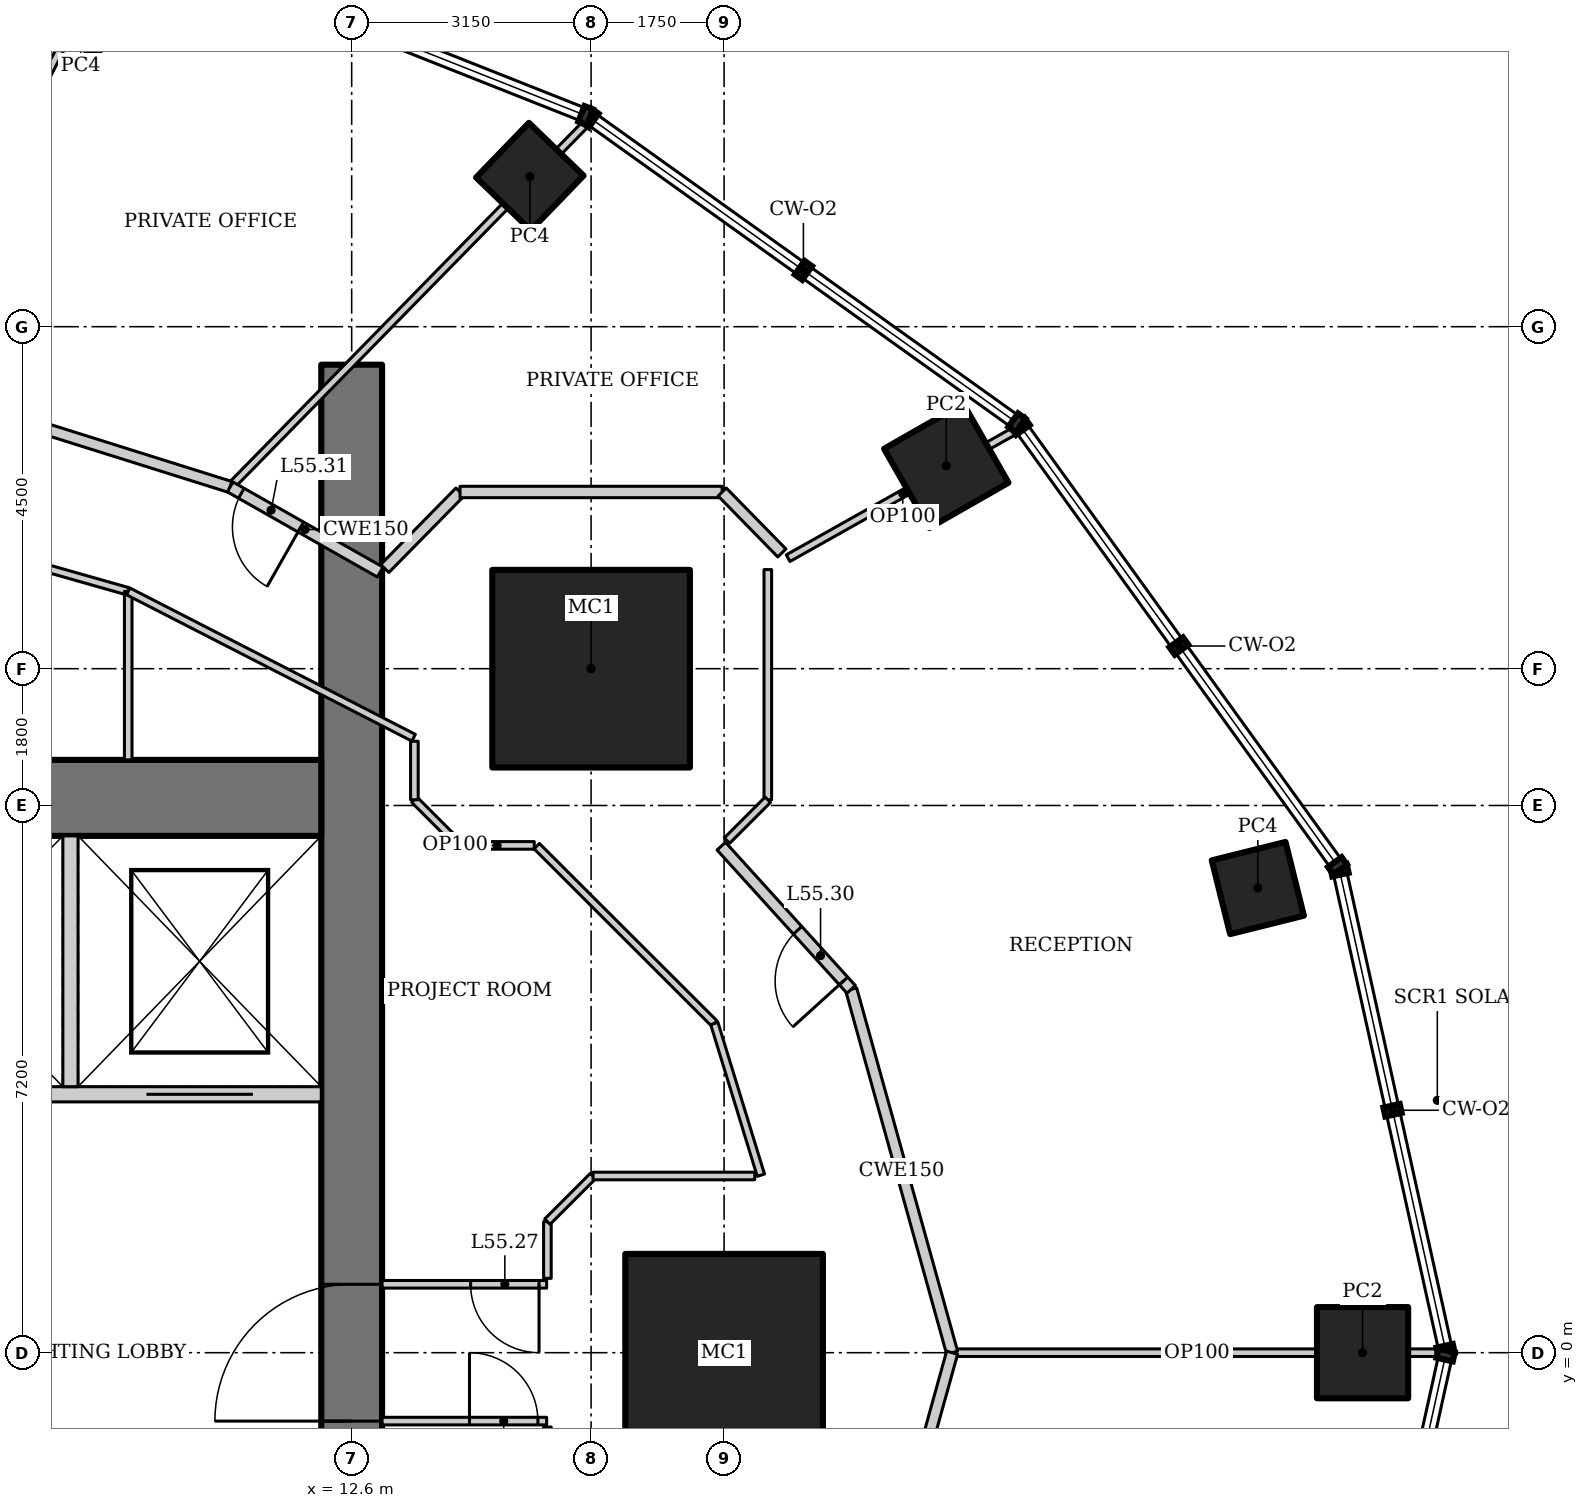
"""IFC4 building model, lengths in metres.
Left out: names, types, materials, properties, quantities, classifications, styles, units other than length and angle.
Written with IfcOpenShell. Run it as: python <this file> out.ifc"""

import sys

from ifc_helpers import new_model, si_unit, direction, frame, frame_2d, origin, origin_2d, place, context, subcontext, project, spatial, rectangle, hollow_rectangle, extrude, element, fill, save


model = new_model("IFC4")
c1 = context("Model", 3, precision=1e-05, world=origin(), true_north=direction((0.0, 1.0)))
c2 = subcontext(c1, "Body", "Model", "MODEL_VIEW")
j1 = project(units=[si_unit("LENGTHUNIT", "METRE"), si_unit("PLANEANGLEUNIT", "RADIAN")], contexts=[c1])
p1 = place(None, origin())
s1 = spatial("IfcSite", under=j1, at=p1, CompositionType="ELEMENT")
p2 = place(p1, origin())
s2 = spatial("IfcBuilding", under=s1, at=p2, CompositionType="ELEMENT")
p3 = place(p2, frame((0.0, 0.0, 236.8)))
s3 = spatial("IfcBuildingStorey", under=s2, at=p3, CompositionType="ELEMENT", Elevation=236.8)
for number, where, z_axis, x_axis in (
    (1, (17.5, 0.0, 0.0), (0.0, 0.0, 1.0), (1.0, 0.0, 0.0)),
    (2, (15.75, 9.0, 0.0), (0.0, 0.0, 1.0), (1.0, 0.0, 0.0)),
):
    element("IfcColumn", number, at=place(p3, frame(where, z_axis=z_axis, x_axis=x_axis)), inside=s3, PredefinedType="COLUMN", context=c2, shape_type="SweptSolid", body=[
        extrude(hollow_rectangle(XDim=2.6, YDim=2.6, WallThickness=0.13, at=origin_2d()), origin(), (0.0, 0.0, 1.0), 4.2),
    ])
p4 = place(p3, frame((25.9, 0.0, 0.0), z_axis=(0.0, 0.0, 1.0), x_axis=(1.0, 0.0, 0.0)))
e3 = element("IfcColumn", 3, at=p4, inside=s3, PredefinedType="COLUMN", context=c2, shape_type="SweptSolid", body=[
    extrude(hollow_rectangle(XDim=1.2, YDim=1.2, WallThickness=0.1, at=origin_2d()), origin(), (0.0, 0.0, 1.0), 4.2),
])
p5 = place(p3, frame((24.522, 6.114, 0.0), z_axis=(0.0, 0.0, 1.0), x_axis=(0.970295726276, 0.2419218956, 0.0)))
e4 = element("IfcColumn", 4, at=p5, inside=s3, PredefinedType="COLUMN", context=c2, shape_type="SweptSolid", body=[
    extrude(hollow_rectangle(XDim=1.0, YDim=1.0, WallThickness=0.08, at=origin_2d()), origin(), (0.0, 0.0, 1.0), 4.2),
])
p6 = place(p3, frame((20.423, 11.67, 0.0), z_axis=(0.0, 0.0, 1.0), x_axis=(0.86824298017, 0.496139221777, 0.0)))
e5 = element("IfcColumn", 5, at=p6, inside=s3, PredefinedType="COLUMN", context=c2, shape_type="SweptSolid", body=[
    extrude(hollow_rectangle(XDim=1.2, YDim=1.2, WallThickness=0.1, at=origin_2d()), origin(), (0.0, 0.0, 1.0), 4.2),
])
for number, where, z_axis, x_axis in (
    (6, (14.944, 15.475, 0.0), (0.0, 0.0, 1.0), (0.695, 0.719, 0.0)),
    (7, (9.035, 17.731, 0.0), (0.0, 0.0, 1.0), (0.454, 0.891, 0.0)),
):
    element("IfcColumn", number, at=place(p3, frame(where, z_axis=z_axis, x_axis=x_axis)), inside=s3, PredefinedType="COLUMN", context=c2, shape_type="SweptSolid", body=[
        extrude(hollow_rectangle(XDim=1.0, YDim=1.0, WallThickness=0.08, at=origin_2d()), origin(), (0.0, 0.0, 1.0), 4.2),
    ])
p7 = place(p3, frame((12.6, -13.0, 0.0), z_axis=(0.0, 0.0, 1.0), x_axis=(0.0, 1.0, 0.0)))
e8 = element("IfcWall", 8, at=p7, inside=s3, PredefinedType="SHEAR", context=c2, shape_type="SweptSolid", body=[
    extrude(rectangle(XDim=26.0, YDim=0.8, at=frame_2d((13.0, 0.0))), origin(), (0.0, 0.0, 1.0), 4.2),
])
p8 = place(p7, frame((12.1, 0.0, 0.0)))
e9 = element("IfcOpeningElement", 9, at=p8, cuts=e8, PredefinedType="OPENING", context=c2, shape_type="SweptSolid", body=[
    extrude(rectangle(XDim=1.8, YDim=2.1, at=frame_2d((0.9, 1.05))), frame((0.0, 0.41, 0.0), z_axis=(0.0, -1.0, 0.0), x_axis=(1.0, 0.0, 0.0)), (0.0, 0.0, 1.0), 0.82),
])
p9 = place(p3, frame((12.2, 7.3, 0.0), z_axis=(0.0, 0.0, 1.0), x_axis=(-1.0, 0.0, 0.0)))
e10 = element("IfcWall", 10, at=p9, inside=s3, PredefinedType="SHEAR", context=c2, shape_type="SweptSolid", body=[
    extrude(rectangle(XDim=6.6, YDim=1.0, at=frame_2d((3.3, 0.0))), origin(), (0.0, 0.0, 1.0), 4.2),
])
p10 = place(p3, frame((12.2, 3.4, 0.0), z_axis=(0.0, 0.0, 1.0), x_axis=(-1.0, 0.0, 0.0)))
e11 = element("IfcWall", 11, at=p10, inside=s3, PredefinedType="SOLIDWALL", context=c2, shape_type="SweptSolid", body=[
    extrude(rectangle(XDim=6.6, YDim=0.2, at=frame_2d((3.3, 0.0))), origin(), (0.0, 0.0, 1.0), 4.2),
])
p11 = place(p10, frame((4.45, 0.0, 0.0)))
e12 = element("IfcOpeningElement", 12, at=p11, cuts=e11, PredefinedType="OPENING", context=c2, shape_type="SweptSolid", body=[
    extrude(rectangle(XDim=1.1, YDim=2.2, at=frame_2d((0.55, 1.1))), frame((0.0, 0.11, 0.0), z_axis=(0.0, -1.0, 0.0), x_axis=(1.0, 0.0, 0.0)), (0.0, 0.0, 1.0), 0.22),
])
p12 = place(p10, frame((0.9, 0.0, 0.0)))
e13 = element("IfcOpeningElement", 13, at=p12, cuts=e11, PredefinedType="OPENING", context=c2, shape_type="SweptSolid", body=[
    extrude(rectangle(XDim=1.4, YDim=2.2, at=frame_2d((0.7, 1.1))), frame((0.0, 0.11, 0.0), z_axis=(0.0, -1.0, 0.0), x_axis=(1.0, 0.0, 0.0)), (0.0, 0.0, 1.0), 0.22),
])
p13 = place(p3, frame((8.9, 3.5, 0.0), z_axis=(0.0, 0.0, 1.0), x_axis=(0.0, 1.0, 0.0)))
e14 = element("IfcWall", 14, at=p13, inside=s3, PredefinedType="SOLIDWALL", context=c2, shape_type="SweptSolid", body=[
    extrude(rectangle(XDim=3.3, YDim=0.2, at=frame_2d((1.65, 0.0))), origin(), (0.0, 0.0, 1.0), 4.2),
])
p14 = place(p3, frame((26.944, 0.0, 0.0), z_axis=(0.0, 0.0, 1.0), x_axis=(-1.0, 0.0, 0.0)))
e15 = element("IfcWall", 15, at=p14, inside=s3, PredefinedType="PARTITIONING", context=c2, shape_type="SweptSolid", body=[
    extrude(rectangle(XDim=6.444, YDim=0.1, at=frame_2d((3.222, 0.0))), origin(), (0.0, 0.0, 1.0), 3.349),
])
p15 = place(p3, frame((15.709, 16.199, 0.0), z_axis=(0.0, 0.0, 1.0), x_axis=(-0.699758297028, -0.71437967898, 0.0)))
e16 = element("IfcWall", 16, at=p15, inside=s3, PredefinedType="PARTITIONING", context=c2, shape_type="SweptSolid", body=[
    extrude(rectangle(XDim=6.729, YDim=0.1, at=frame_2d((3.365, 0.0))), origin(), (0.0, 0.0, 1.0), 3.41),
])
p16 = place(p3, frame((9.54, 18.65, 0.0), z_axis=(0.0, 0.0, 1.0), x_axis=(-0.458420942987, -0.888735190611, 0.0)))
e17 = element("IfcWall", 17, at=p16, inside=s3, PredefinedType="PARTITIONING", context=c2, shape_type="SweptSolid", body=[
    extrude(rectangle(XDim=6.584, YDim=0.1, at=frame_2d((3.292, 0.0))), origin(), (0.0, 0.0, 1.0), 3.108),
])
p17 = place(p3, frame((20.5, 0.0, 0.0), z_axis=(0.0, 0.0, 1.0), x_axis=(-0.26770731566, 0.963500281859, 0.0)))
e18 = element("IfcWall", 18, at=p17, inside=s3, PredefinedType="PARTITIONING", context=c2, shape_type="SweptSolid", body=[
    extrude(rectangle(XDim=4.961, YDim=0.15, at=frame_2d((2.48, 0.0))), origin(), (0.0, 0.0, 1.0), 4.05),
])
p18 = place(p3, frame((11.001, 11.392, 0.0), z_axis=(0.0, 0.0, 1.0), x_axis=(-0.954031103669, 0.299707612903, 0.0)))
e19 = element("IfcWall", 19, at=p18, inside=s3, PredefinedType="PARTITIONING", context=c2, shape_type="SweptSolid", body=[
    extrude(rectangle(XDim=4.695, YDim=0.15, at=frame_2d((2.348, 0.0))), origin(), (0.0, 0.0, 1.0), 4.05),
])
p19 = place(p18, frame((3.645, 0.0, 0.0)))
e20 = element("IfcOpeningElement", 20, at=p19, cuts=e19, PredefinedType="OPENING", context=c2, shape_type="SweptSolid", body=[
    extrude(rectangle(XDim=0.9, YDim=2.1, at=frame_2d((0.45, 1.05))), frame((0.0, 0.085, 0.0), z_axis=(0.0, -1.0, 0.0), x_axis=(1.0, 0.0, 0.0)), (0.0, 0.0, 1.0), 0.17),
])
p20 = place(p3, frame((19.172, -4.78, 0.0), z_axis=(0.0, 0.0, 1.0), x_axis=(0.26770731566, 0.963500281859, 0.0)))
e21 = element("IfcWall", 21, at=p20, inside=s3, PredefinedType="PARTITIONING", context=c2, shape_type="SweptSolid", body=[
    extrude(rectangle(XDim=4.961, YDim=0.15, at=frame_2d((2.48, 0.0))), origin(), (0.0, 0.0, 1.0), 4.05),
])
p21 = place(p20, frame((0.15, 0.0, 0.0)))
e22 = element("IfcOpeningElement", 22, at=p21, cuts=e21, PredefinedType="OPENING", context=c2, shape_type="SweptSolid", body=[
    extrude(rectangle(XDim=0.9, YDim=2.1, at=frame_2d((0.45, 1.05))), frame((0.0, 0.085, 0.0), z_axis=(0.0, -1.0, 0.0), x_axis=(1.0, 0.0, 0.0)), (0.0, 0.0, 1.0), 0.17),
])
p22 = place(p3, frame((5.68, 11.147, 0.0), z_axis=(0.0, 0.0, 1.0), x_axis=(0.961970251804, -0.27315423234, 0.0)))
e23 = element("IfcWall", 23, at=p22, inside=s3, PredefinedType="PARTITIONING", context=c2, shape_type="SweptSolid", body=[
    extrude(rectangle(XDim=4.137, YDim=0.1, at=frame_2d((2.069, 0.0))), origin(), (0.0, 0.0, 1.0), 4.05),
])
p23 = place(p3, frame((9.66, 10.017, 0.0), z_axis=(0.0, 0.0, 1.0), x_axis=(0.0, -1.0, 0.0)))
e24 = element("IfcWall", 24, at=p23, inside=s3, PredefinedType="PARTITIONING", context=c2, shape_type="SweptSolid", body=[
    extrude(rectangle(XDim=2.217, YDim=0.1, at=frame_2d((1.108, 0.0))), origin(), (0.0, 0.0, 1.0), 4.05),
])
p24 = place(p3, frame((21.358, 12.15, 0.0), z_axis=(0.0, 0.0, 1.0), x_axis=(-0.871730019583, -0.489986502832, 0.0)))
e25 = element("IfcWall", 25, at=p24, inside=s3, PredefinedType="PARTITIONING", context=c2, shape_type="SweptSolid", body=[
    extrude(rectangle(XDim=3.46, YDim=0.1, at=frame_2d((1.73, 0.0))), origin(), (0.0, 0.0, 1.0), 3.524),
])
p25 = place(p3, frame((19.172, 4.78, 0.0), z_axis=(0.0, 0.0, 1.0), x_axis=(-0.671721890643, 0.74080341632, 0.0)))
e26 = element("IfcWall", 26, at=p25, inside=s3, PredefinedType="PARTITIONING", context=c2, shape_type="SweptSolid", body=[
    extrude(rectangle(XDim=2.544, YDim=0.15, at=frame_2d((1.272, 0.0))), origin(), (0.0, 0.0, 1.0), 4.05),
])
p26 = place(p25, frame((0.15, 0.0, 0.0)))
e27 = element("IfcOpeningElement", 27, at=p26, cuts=e26, PredefinedType="OPENING", context=c2, shape_type="SweptSolid", body=[
    extrude(rectangle(XDim=0.9, YDim=2.1, at=frame_2d((0.45, 1.05))), frame((0.0, 0.085, 0.0), z_axis=(0.0, -1.0, 0.0), x_axis=(1.0, 0.0, 0.0)), (0.0, 0.0, 1.0), 0.17),
])
p27 = place(p3, frame((12.975, 10.271, 0.0), z_axis=(0.0, 0.0, 1.0), x_axis=(-0.869722107117, 0.493541747366, 0.0)))
e28 = element("IfcWall", 28, at=p27, inside=s3, PredefinedType="PARTITIONING", context=c2, shape_type="SweptSolid", body=[
    extrude(rectangle(XDim=2.27, YDim=0.15, at=frame_2d((1.135, 0.0))), origin(), (0.0, 0.0, 1.0), 4.05),
])
p28 = place(p27, frame((1.2, 0.0, 0.0)))
e29 = element("IfcOpeningElement", 29, at=p28, cuts=e28, PredefinedType="OPENING", context=c2, shape_type="SweptSolid", body=[
    extrude(rectangle(XDim=0.9, YDim=2.1, at=frame_2d((0.45, 1.05))), frame((0.0, 0.085, 0.0), z_axis=(0.0, -1.0, 0.0), x_axis=(1.0, 0.0, 0.0)), (0.0, 0.0, 1.0), 0.17),
])
p29 = place(p3, frame((9.66, 10.017, 0.0), z_axis=(0.0, 0.0, 1.0), x_axis=(0.889833724874, -0.456284935185, 0.0)))
e30 = element("IfcWall", 30, at=p29, inside=s3, PredefinedType="PARTITIONING", context=c2, shape_type="SweptSolid", body=[
    extrude(rectangle(XDim=4.22, YDim=0.1, at=frame_2d((2.11, 0.0))), origin(), (0.0, 0.0, 1.0), 4.05),
])
p30 = place(p3, frame((15.035, 6.665, 0.0), z_axis=(0.0, 0.0, 1.0), x_axis=(0.707587114823, -0.70662612104, 0.0)))
e31 = element("IfcWall", 31, at=p30, inside=s3, PredefinedType="PARTITIONING", context=c2, shape_type="SweptSolid", body=[
    extrude(rectangle(XDim=3.303, YDim=0.1, at=frame_2d((1.651, 0.0))), origin(), (0.0, 0.0, 1.0), 4.05),
])
p31 = place(p3, frame((15.002, 6.675, 0.0), z_axis=(0.0, 0.0, 1.0), x_axis=(-1.0, 0.0, 0.0)))
e32 = element("IfcWall", 32, at=p31, inside=s3, PredefinedType="PARTITIONING", context=c2, shape_type="SweptSolid", body=[
    extrude(rectangle(XDim=0.977, YDim=0.1, at=frame_2d((0.488, 0.0))), origin(), (0.0, 0.0, 1.0), 4.05),
])
p32 = place(p3, frame((14.025, 6.675, 0.0), z_axis=(0.0, 0.0, 1.0), x_axis=(-0.707106781187, 0.707106781187, 0.0)))
e33 = element("IfcWall", 33, at=p32, inside=s3, PredefinedType="PARTITIONING", context=c2, shape_type="SweptSolid", body=[
    extrude(rectangle(XDim=0.849, YDim=0.1, at=frame_2d((0.425, 0.0))), origin(), (0.0, 0.0, 1.0), 4.05),
])
p33 = place(p3, frame((13.425, 7.275, 0.0), z_axis=(0.0, 0.0, 1.0), x_axis=(0.0, 1.0, 0.0)))
e34 = element("IfcWall", 34, at=p33, inside=s3, PredefinedType="PARTITIONING", context=c2, shape_type="SweptSolid", body=[
    extrude(rectangle(XDim=0.77, YDim=0.1, at=frame_2d((0.385, 0.0))), origin(), (0.0, 0.0, 1.0), 4.05),
])
p34 = place(p3, frame((18.075, 10.304, 0.0), z_axis=(0.0, 0.0, 1.0), x_axis=(0.0, -1.0, 0.0)))
e35 = element("IfcWall", 35, at=p34, inside=s3, PredefinedType="PARTITIONING", context=c2, shape_type="SweptSolid", body=[
    extrude(rectangle(XDim=3.029, YDim=0.1, at=frame_2d((1.514, 0.0))), origin(), (0.0, 0.0, 1.0), 3.6),
])
p35 = place(p3, frame((18.075, 7.275, 0.0), z_axis=(0.0, 0.0, 1.0), x_axis=(-0.707106781187, -0.707106781187, 0.0)))
e36 = element("IfcWall", 36, at=p35, inside=s3, PredefinedType="PARTITIONING", context=c2, shape_type="SweptSolid", body=[
    extrude(rectangle(XDim=0.76, YDim=0.1, at=frame_2d((0.38, 0.0))), origin(), (0.0, 0.0, 1.0), 4.05),
])
p36 = place(p3, frame((13.036, 10.319, 0.0), z_axis=(0.0, 0.0, 1.0), x_axis=(0.701113567316, 0.713049623606, 0.0)))
e37 = element("IfcWall", 37, at=p36, inside=s3, PredefinedType="PARTITIONING", context=c2, shape_type="SweptSolid", body=[
    extrude(rectangle(XDim=1.411, YDim=0.15, at=frame_2d((0.706, 0.0))), origin(), (0.0, 0.0, 1.0), 4.05),
])
p37 = place(p3, frame((14.025, 11.325, 0.0), z_axis=(0.0, 0.0, 1.0), x_axis=(1.0, 0.0, 0.0)))
e38 = element("IfcWall", 38, at=p37, inside=s3, PredefinedType="PARTITIONING", context=c2, shape_type="SweptSolid", body=[
    extrude(rectangle(XDim=3.449, YDim=0.15, at=frame_2d((1.725, 0.0))), origin(), (0.0, 0.0, 1.0), 4.05),
])
p38 = place(p3, frame((17.475, 11.325, 0.0), z_axis=(0.0, 0.0, 1.0), x_axis=(0.699453593529, -0.714678018761, 0.0)))
e39 = element("IfcWall", 39, at=p38, inside=s3, PredefinedType="PARTITIONING", context=c2, shape_type="SweptSolid", body=[
    extrude(rectangle(XDim=1.123, YDim=0.15, at=frame_2d((0.561, 0.0))), origin(), (0.0, 0.0, 1.0), 4.05),
])
p39 = place(p3, frame((13.0, -0.9, 0.0), z_axis=(0.0, 0.0, 1.0), x_axis=(1.0, 0.0, 0.0)))
e40 = element("IfcWall", 40, at=p39, inside=s3, PredefinedType="PARTITIONING", context=c2, shape_type="SweptSolid", body=[
    extrude(rectangle(XDim=2.165, YDim=0.1, at=frame_2d((1.083, 0.0))), origin(), (0.0, 0.0, 1.0), 4.05),
])
p40 = place(p39, frame((1.15, 0.0, 0.0)))
e41 = element("IfcOpeningElement", 41, at=p40, cuts=e40, PredefinedType="OPENING", context=c2, shape_type="SweptSolid", body=[
    extrude(rectangle(XDim=0.9, YDim=2.1, at=frame_2d((0.45, 1.05))), frame((0.0, 0.06, 0.0), z_axis=(0.0, -1.0, 0.0), x_axis=(1.0, 0.0, 0.0)), (0.0, 0.0, 1.0), 0.12),
])
p41 = place(p3, frame((17.372, 4.331, 0.0), z_axis=(0.0, 0.0, 1.0), x_axis=(0.293231279211, -0.956041535129, 0.0)))
e42 = element("IfcWall", 42, at=p41, inside=s3, PredefinedType="PARTITIONING", context=c2, shape_type="SweptSolid", body=[
    extrude(rectangle(XDim=2.088, YDim=0.1, at=frame_2d((1.044, 0.0))), origin(), (0.0, 0.0, 1.0), 4.05),
])
p42 = place(p3, frame((15.165, 0.9, 0.0), z_axis=(0.0, 0.0, 1.0), x_axis=(-1.0, 0.0, 0.0)))
e43 = element("IfcWall", 43, at=p42, inside=s3, PredefinedType="PARTITIONING", context=c2, shape_type="SweptSolid", body=[
    extrude(rectangle(XDim=2.165, YDim=0.1, at=frame_2d((1.083, 0.0))), origin(), (0.0, 0.0, 1.0), 4.05),
])
p43 = place(p42, frame((0.1, 0.0, 0.0)))
e44 = element("IfcOpeningElement", 44, at=p43, cuts=e43, PredefinedType="OPENING", context=c2, shape_type="SweptSolid", body=[
    extrude(rectangle(XDim=0.9, YDim=2.1, at=frame_2d((0.45, 1.05))), frame((0.0, 0.06, 0.0), z_axis=(0.0, -1.0, 0.0), x_axis=(1.0, 0.0, 0.0)), (0.0, 0.0, 1.0), 0.12),
])
for number, where, z_axis, x_axis in (
    (45, (15.175, -1.725, 0.0), (0.0, 0.0, 1.0), (0.0, 1.0, 0.0)),
    (46, (15.175, 0.978, 0.0), (0.0, 0.0, 1.0), (0.0, 1.0, 0.0)),
):
    element("IfcWall", number, at=place(p3, frame(where, z_axis=z_axis, x_axis=x_axis)), inside=s3, PredefinedType="PARTITIONING", context=c2, shape_type="SweptSolid", body=[
        extrude(rectangle(XDim=0.746, YDim=0.1, at=frame_2d((0.373, 0.0))), origin(), (0.0, 0.0, 1.0), 4.05),
    ])
p44 = place(p3, frame((15.175, 1.725, 0.0), z_axis=(0.0, 0.0, 1.0), x_axis=(0.707106781187, 0.707106781187, 0.0)))
e47 = element("IfcWall", 47, at=p44, inside=s3, PredefinedType="PARTITIONING", context=c2, shape_type="SweptSolid", body=[
    extrude(rectangle(XDim=0.849, YDim=0.1, at=frame_2d((0.425, 0.0))), origin(), (0.0, 0.0, 1.0), 4.05),
])
p45 = place(p3, frame((15.775, 2.325, 0.0), z_axis=(0.0, 0.0, 1.0), x_axis=(1.0, 0.0, 0.0)))
e48 = element("IfcWall", 48, at=p45, inside=s3, PredefinedType="PARTITIONING", context=c2, shape_type="SweptSolid", body=[
    extrude(rectangle(XDim=2.128, YDim=0.1, at=frame_2d((1.064, 0.0))), origin(), (0.0, 0.0, 1.0), 4.05),
])
p46 = place(p8, origin())
e49 = element("IfcDoor", 49, at=p46, inside=s3, OperationType="DOUBLE_DOOR_DOUBLE_SWING", PredefinedType="DOOR", context=c2, shape_type="SweptSolid", body=[
    extrude(rectangle(XDim=1.8, YDim=2.1, at=frame_2d((0.9, 1.05))), frame((0.0, 0.025, 0.0), z_axis=(0.0, -1.0, 0.0), x_axis=(1.0, 0.0, 0.0)), (0.0, 0.0, 1.0), 0.05),
])
fill(e9, e49)
p47 = place(p12, origin())
e50 = element("IfcDoor", 50, at=p47, inside=s3, OperationType="DOUBLE_DOOR_SLIDING", PredefinedType="DOOR", context=c2, shape_type="SweptSolid", body=[
    extrude(rectangle(XDim=1.4, YDim=2.2, at=frame_2d((0.7, 1.1))), frame((0.0, 0.025, 0.0), z_axis=(0.0, -1.0, 0.0), x_axis=(1.0, 0.0, 0.0)), (0.0, 0.0, 1.0), 0.05),
])
fill(e13, e50)
p48 = place(p40, origin())
e51 = element("IfcDoor", 51, at=p48, inside=s3, OperationType="SINGLE_SWING_LEFT", PredefinedType="DOOR", context=c2, shape_type="SweptSolid", body=[
    extrude(rectangle(XDim=0.9, YDim=2.1, at=frame_2d((0.45, 1.05))), frame((0.0, 0.025, 0.0), z_axis=(0.0, -1.0, 0.0), x_axis=(1.0, 0.0, 0.0)), (0.0, 0.0, 1.0), 0.05),
])
fill(e41, e51)
p49 = place(p43, origin())
e52 = element("IfcDoor", 52, at=p49, inside=s3, OperationType="SINGLE_SWING_LEFT", PredefinedType="DOOR", context=c2, shape_type="SweptSolid", body=[
    extrude(rectangle(XDim=0.9, YDim=2.1, at=frame_2d((0.45, 1.05))), frame((0.0, 0.025, 0.0), z_axis=(0.0, -1.0, 0.0), x_axis=(1.0, 0.0, 0.0)), (0.0, 0.0, 1.0), 0.05),
])
fill(e44, e52)
p50 = place(p26, origin())
e53 = element("IfcDoor", 53, at=p50, inside=s3, OperationType="SINGLE_SWING_LEFT", PredefinedType="DOOR", context=c2, shape_type="SweptSolid", body=[
    extrude(rectangle(XDim=0.9, YDim=2.1, at=frame_2d((0.45, 1.05))), frame((0.0, 0.025, 0.0), z_axis=(0.0, -1.0, 0.0), x_axis=(1.0, 0.0, 0.0)), (0.0, 0.0, 1.0), 0.05),
])
fill(e27, e53)
p51 = place(p28, origin())
e54 = element("IfcDoor", 54, at=p51, inside=s3, OperationType="SINGLE_SWING_LEFT", PredefinedType="DOOR", context=c2, shape_type="SweptSolid", body=[
    extrude(rectangle(XDim=0.9, YDim=2.1, at=frame_2d((0.45, 1.05))), frame((0.0, 0.025, 0.0), z_axis=(0.0, -1.0, 0.0), x_axis=(1.0, 0.0, 0.0)), (0.0, 0.0, 1.0), 0.05),
])
fill(e29, e54)
save(model, sys.argv[1])
